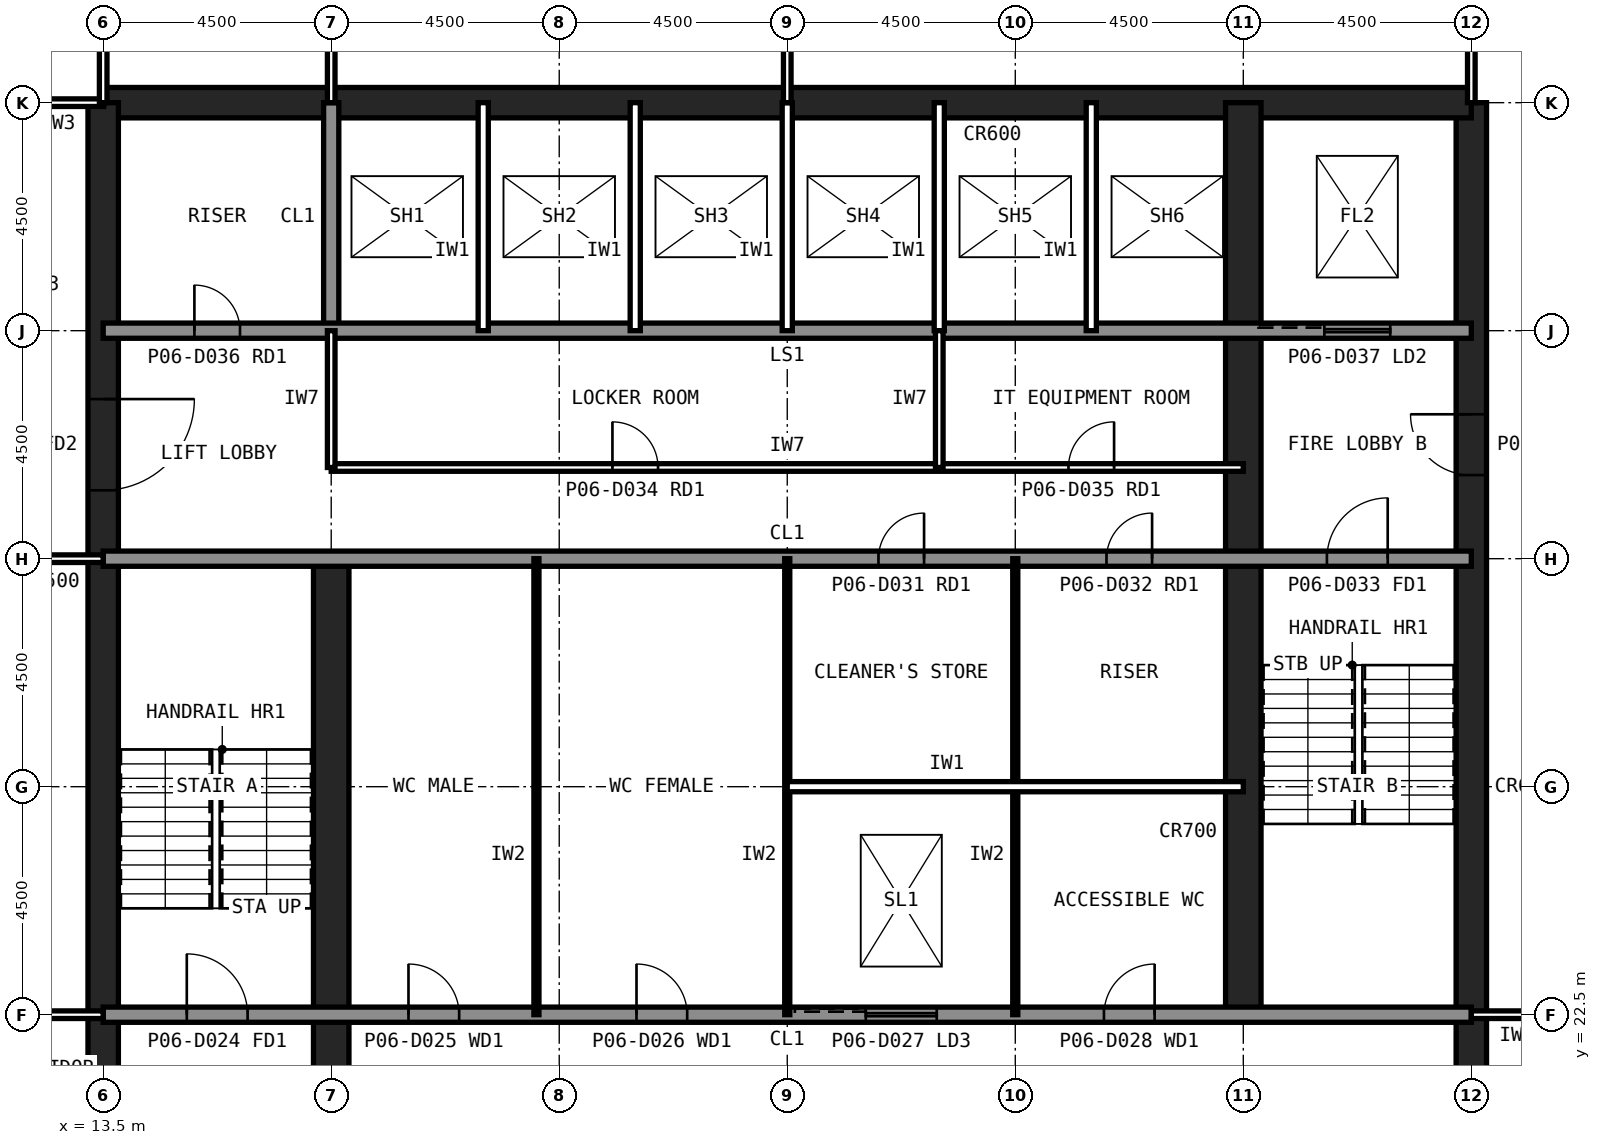
"""IFC4 building model, lengths in metres.
Left out: names, types, materials, properties, quantities, classifications, styles, units other than length and angle.
Written with IfcOpenShell. Run it as: python <this file> out.ifc"""

import sys

from ifc_helpers import new_model, si_unit, direction, frame, frame_2d, origin, place, context, subcontext, project, spatial, rectangle, extrude, element, fill, save


model = new_model("IFC4")
c1 = context("Model", 3, precision=1e-05, world=origin(), true_north=direction((0.0, 1.0)))
c2 = subcontext(c1, "Body", "Model", "MODEL_VIEW")
j1 = project(units=[si_unit("LENGTHUNIT", "METRE"), si_unit("PLANEANGLEUNIT", "RADIAN")], contexts=[c1])
p1 = place(None, origin())
s1 = spatial("IfcSite", under=j1, at=p1, CompositionType="ELEMENT")
p2 = place(p1, origin())
s2 = spatial("IfcBuilding", under=s1, at=p2, CompositionType="ELEMENT")
p3 = place(p2, frame((0.0, 0.0, 29.0)))
s3 = spatial("IfcBuildingStorey", under=s2, at=p3, CompositionType="ELEMENT", Elevation=29.0)
p4 = place(p3, frame((40.5, 13.5, 0.0), z_axis=(0.0, 0.0, 1.0), x_axis=(0.0, 1.0, 0.0)))
e1 = element("IfcWall", 1, at=p4, inside=s3, PredefinedType="SHEAR", context=c2, shape_type="SweptSolid", body=[
    extrude(rectangle(XDim=27.0, YDim=0.6, at=frame_2d((13.5, 0.0))), origin(), (0.0, 0.0, 1.0), 4.2),
])
p5 = place(p4, frame((5.85, 0.0, 0.0)))
e2 = element("IfcOpeningElement", 2, at=p5, cuts=e1, PredefinedType="OPENING", context=c2, shape_type="SweptSolid", body=[
    extrude(rectangle(XDim=1.8, YDim=2.1, at=frame_2d((0.9, 1.05))), frame((0.0, 0.31, 0.0), z_axis=(0.0, -1.0, 0.0), x_axis=(1.0, 0.0, 0.0)), (0.0, 0.0, 1.0), 0.62),
])
p6 = place(p4, frame((19.65, 0.0, 0.0)))
e3 = element("IfcOpeningElement", 3, at=p6, cuts=e1, PredefinedType="OPENING", context=c2, shape_type="SweptSolid", body=[
    extrude(rectangle(XDim=1.2, YDim=2.1, at=frame_2d((0.6, 1.05))), frame((0.0, 0.31, 0.0), z_axis=(0.0, -1.0, 0.0), x_axis=(1.0, 0.0, 0.0)), (0.0, 0.0, 1.0), 0.62),
])
p7 = place(p3, frame((40.5, 40.5, 0.0), z_axis=(0.0, 0.0, 1.0), x_axis=(-1.0, 0.0, 0.0)))
e4 = element("IfcWall", 4, at=p7, inside=s3, PredefinedType="SHEAR", context=c2, shape_type="SweptSolid", body=[
    extrude(rectangle(XDim=27.0, YDim=0.6, at=frame_2d((13.5, 0.0))), origin(), (0.0, 0.0, 1.0), 4.2),
])
p8 = place(p3, frame((13.5, 40.5, 0.0), z_axis=(0.0, 0.0, 1.0), x_axis=(0.0, -1.0, 0.0)))
e5 = element("IfcWall", 5, at=p8, inside=s3, PredefinedType="SHEAR", context=c2, shape_type="SweptSolid", body=[
    extrude(rectangle(XDim=27.0, YDim=0.6, at=frame_2d((13.5, 0.0))), origin(), (0.0, 0.0, 1.0), 4.2),
])
p9 = place(p8, frame((19.65, 0.0, 0.0)))
e6 = element("IfcOpeningElement", 6, at=p9, cuts=e5, PredefinedType="OPENING", context=c2, shape_type="SweptSolid", body=[
    extrude(rectangle(XDim=1.2, YDim=2.1, at=frame_2d((0.6, 1.05))), frame((0.0, 0.31, 0.0), z_axis=(0.0, -1.0, 0.0), x_axis=(1.0, 0.0, 0.0)), (0.0, 0.0, 1.0), 0.62),
])
p10 = place(p8, frame((5.85, 0.0, 0.0)))
e7 = element("IfcOpeningElement", 7, at=p10, cuts=e5, PredefinedType="OPENING", context=c2, shape_type="SweptSolid", body=[
    extrude(rectangle(XDim=1.8, YDim=2.1, at=frame_2d((0.9, 1.05))), frame((0.0, 0.31, 0.0), z_axis=(0.0, -1.0, 0.0), x_axis=(1.0, 0.0, 0.0)), (0.0, 0.0, 1.0), 0.62),
])
p11 = place(p3, frame((18.0, 13.5, 0.0), z_axis=(0.0, 0.0, 1.0), x_axis=(0.0, 1.0, 0.0)))
e8 = element("IfcWall", 8, at=p11, inside=s3, PredefinedType="SHEAR", context=c2, shape_type="SweptSolid", body=[
    extrude(rectangle(XDim=18.0, YDim=0.7, at=frame_2d((9.0, 0.0))), origin(), (0.0, 0.0, 1.0), 4.2),
])
p12 = place(p3, frame((18.0, 36.0, 0.0), z_axis=(0.0, 0.0, 1.0), x_axis=(0.0, 1.0, 0.0)))
e9 = element("IfcWall", 9, at=p12, inside=s3, PredefinedType="SOLIDWALL", context=c2, shape_type="SweptSolid", body=[
    extrude(rectangle(XDim=4.5, YDim=0.3, at=frame_2d((2.25, 0.0))), origin(), (0.0, 0.0, 1.0), 4.04),
])
p13 = place(p3, frame((36.0, 22.5, 0.0), z_axis=(0.0, 0.0, 1.0), x_axis=(0.0, 1.0, 0.0)))
e10 = element("IfcWall", 10, at=p13, inside=s3, PredefinedType="SHEAR", context=c2, shape_type="SweptSolid", body=[
    extrude(rectangle(XDim=18.0, YDim=0.7, at=frame_2d((9.0, 0.0))), origin(), (0.0, 0.0, 1.0), 4.2),
])
p14 = place(p3, frame((13.5, 36.0, 0.0), z_axis=(0.0, 0.0, 1.0), x_axis=(1.0, 0.0, 0.0)))
e11 = element("IfcWall", 11, at=p14, inside=s3, PredefinedType="SOLIDWALL", context=c2, shape_type="SweptSolid", body=[
    extrude(rectangle(XDim=27.0, YDim=0.3, at=frame_2d((13.5, 0.0))), origin(), (0.0, 0.0, 1.0), 4.04),
])
p15 = place(p14, frame((1.8, 0.0, 0.0)))
e12 = element("IfcOpeningElement", 12, at=p15, cuts=e11, PredefinedType="OPENING", context=c2, shape_type="SweptSolid", body=[
    extrude(rectangle(XDim=0.9, YDim=2.1, at=frame_2d((0.45, 1.05))), frame((0.0, 0.16, 0.0), z_axis=(0.0, -1.0, 0.0), x_axis=(1.0, 0.0, 0.0)), (0.0, 0.0, 1.0), 0.32),
])
p16 = place(p14, frame((24.1, 0.0, 0.0)))
e13 = element("IfcOpeningElement", 13, at=p16, cuts=e11, PredefinedType="OPENING", context=c2, shape_type="SweptSolid", body=[
    extrude(rectangle(XDim=1.3, YDim=2.2, at=frame_2d((0.65, 1.1))), frame((0.0, 0.16, 0.0), z_axis=(0.0, -1.0, 0.0), x_axis=(1.0, 0.0, 0.0)), (0.0, 0.0, 1.0), 0.32),
])
p17 = place(p3, frame((13.5, 22.5, 0.0), z_axis=(0.0, 0.0, 1.0), x_axis=(1.0, 0.0, 0.0)))
e14 = element("IfcWall", 14, at=p17, inside=s3, PredefinedType="SOLIDWALL", context=c2, shape_type="SweptSolid", body=[
    extrude(rectangle(XDim=27.0, YDim=0.3, at=frame_2d((13.5, 0.0))), origin(), (0.0, 0.0, 1.0), 4.04),
])
p18 = place(p17, frame((1.65, 0.0, 0.0)))
e15 = element("IfcOpeningElement", 15, at=p18, cuts=e14, PredefinedType="OPENING", context=c2, shape_type="SweptSolid", body=[
    extrude(rectangle(XDim=1.2, YDim=2.1, at=frame_2d((0.6, 1.05))), frame((0.0, 0.16, 0.0), z_axis=(0.0, -1.0, 0.0), x_axis=(1.0, 0.0, 0.0)), (0.0, 0.0, 1.0), 0.32),
])
p19 = place(p17, frame((6.025, 0.0, 0.0)))
e16 = element("IfcOpeningElement", 16, at=p19, cuts=e14, PredefinedType="OPENING", context=c2, shape_type="SweptSolid", body=[
    extrude(rectangle(XDim=1.0, YDim=2.1, at=frame_2d((0.5, 1.05))), frame((0.0, 0.16, 0.0), z_axis=(0.0, -1.0, 0.0), x_axis=(1.0, 0.0, 0.0)), (0.0, 0.0, 1.0), 0.32),
])
p20 = place(p17, frame((10.525, 0.0, 0.0)))
e17 = element("IfcOpeningElement", 17, at=p20, cuts=e14, PredefinedType="OPENING", context=c2, shape_type="SweptSolid", body=[
    extrude(rectangle(XDim=1.0, YDim=2.1, at=frame_2d((0.5, 1.05))), frame((0.0, 0.16, 0.0), z_axis=(0.0, -1.0, 0.0), x_axis=(1.0, 0.0, 0.0)), (0.0, 0.0, 1.0), 0.32),
])
p21 = place(p17, frame((19.75, 0.0, 0.0)))
e18 = element("IfcOpeningElement", 18, at=p21, cuts=e14, PredefinedType="OPENING", context=c2, shape_type="SweptSolid", body=[
    extrude(rectangle(XDim=1.0, YDim=2.1, at=frame_2d((0.5, 1.05))), frame((0.0, 0.16, 0.0), z_axis=(0.0, -1.0, 0.0), x_axis=(1.0, 0.0, 0.0)), (0.0, 0.0, 1.0), 0.32),
])
p22 = place(p17, frame((15.05, 0.0, 0.0)))
e19 = element("IfcOpeningElement", 19, at=p22, cuts=e14, PredefinedType="OPENING", context=c2, shape_type="SweptSolid", body=[
    extrude(rectangle(XDim=1.4, YDim=2.4, at=frame_2d((0.7, 1.2))), frame((0.0, 0.16, 0.0), z_axis=(0.0, -1.0, 0.0), x_axis=(1.0, 0.0, 0.0)), (0.0, 0.0, 1.0), 0.32),
])
p23 = place(p3, frame((13.5, 31.5, 0.0), z_axis=(0.0, 0.0, 1.0), x_axis=(1.0, 0.0, 0.0)))
e20 = element("IfcWall", 20, at=p23, inside=s3, PredefinedType="SOLIDWALL", context=c2, shape_type="SweptSolid", body=[
    extrude(rectangle(XDim=27.0, YDim=0.3, at=frame_2d((13.5, 0.0))), origin(), (0.0, 0.0, 1.0), 4.04),
])
p24 = place(p23, frame((24.15, 0.0, 0.0)))
e21 = element("IfcOpeningElement", 21, at=p24, cuts=e20, PredefinedType="OPENING", context=c2, shape_type="SweptSolid", body=[
    extrude(rectangle(XDim=1.2, YDim=2.1, at=frame_2d((0.6, 1.05))), frame((0.0, 0.16, 0.0), z_axis=(0.0, -1.0, 0.0), x_axis=(1.0, 0.0, 0.0)), (0.0, 0.0, 1.0), 0.32),
])
p25 = place(p23, frame((15.3, 0.0, 0.0)))
e22 = element("IfcOpeningElement", 22, at=p25, cuts=e20, PredefinedType="OPENING", context=c2, shape_type="SweptSolid", body=[
    extrude(rectangle(XDim=0.9, YDim=2.1, at=frame_2d((0.45, 1.05))), frame((0.0, 0.16, 0.0), z_axis=(0.0, -1.0, 0.0), x_axis=(1.0, 0.0, 0.0)), (0.0, 0.0, 1.0), 0.32),
])
p26 = place(p23, frame((19.8, 0.0, 0.0)))
e23 = element("IfcOpeningElement", 23, at=p26, cuts=e20, PredefinedType="OPENING", context=c2, shape_type="SweptSolid", body=[
    extrude(rectangle(XDim=0.9, YDim=2.1, at=frame_2d((0.45, 1.05))), frame((0.0, 0.16, 0.0), z_axis=(0.0, -1.0, 0.0), x_axis=(1.0, 0.0, 0.0)), (0.0, 0.0, 1.0), 0.32),
])
for number, where, z_axis, x_axis in (
    (24, (21.0, 36.0, 0.0), (0.0, 0.0, 1.0), (0.0, 1.0, 0.0)),
    (25, (24.0, 36.0, 0.0), (0.0, 0.0, 1.0), (0.0, 1.0, 0.0)),
    (26, (27.0, 36.0, 0.0), (0.0, 0.0, 1.0), (0.0, 1.0, 0.0)),
    (27, (30.0, 36.0, 0.0), (0.0, 0.0, 1.0), (0.0, 1.0, 0.0)),
    (28, (33.0, 36.0, 0.0), (0.0, 0.0, 1.0), (0.0, 1.0, 0.0)),
):
    element("IfcWall", number, at=place(p3, frame(where, z_axis=z_axis, x_axis=x_axis)), inside=s3, PredefinedType="PARTITIONING", context=c2, shape_type="SweptSolid", body=[
        extrude(rectangle(XDim=4.5, YDim=0.2, at=frame_2d((2.25, 0.0))), origin(), (0.0, 0.0, 1.0), 4.04),
    ])
for number, where, z_axis, x_axis in (
    (29, (22.05, 22.5, 0.0), (0.0, 0.0, 1.0), (0.0, 1.0, 0.0)),
    (30, (27.0, 22.5, 0.0), (0.0, 0.0, 1.0), (0.0, 1.0, 0.0)),
    (31, (31.5, 22.5, 0.0), (0.0, 0.0, 1.0), (0.0, 1.0, 0.0)),
):
    element("IfcWall", number, at=place(p3, frame(where, z_axis=z_axis, x_axis=x_axis)), inside=s3, PredefinedType="PLUMBINGWALL", context=c2, shape_type="SweptSolid", body=[
        extrude(rectangle(XDim=9.0, YDim=0.1, at=frame_2d((4.5, 0.0))), origin(), (0.0, 0.0, 1.0), 4.04),
    ])
p27 = place(p3, frame((27.0, 27.0, 0.0), z_axis=(0.0, 0.0, 1.0), x_axis=(1.0, 0.0, 0.0)))
e32 = element("IfcWall", 32, at=p27, inside=s3, PredefinedType="PARTITIONING", context=c2, shape_type="SweptSolid", body=[
    extrude(rectangle(XDim=9.0, YDim=0.2, at=frame_2d((4.5, 0.0))), origin(), (0.0, 0.0, 1.0), 4.04),
])
p28 = place(p3, frame((18.0, 33.3, 0.0), z_axis=(0.0, 0.0, 1.0), x_axis=(1.0, 0.0, 0.0)))
e33 = element("IfcWall", 33, at=p28, inside=s3, PredefinedType="PARTITIONING", context=c2, shape_type="SweptSolid", body=[
    extrude(rectangle(XDim=18.0, YDim=0.15, at=frame_2d((9.0, 0.0))), origin(), (0.0, 0.0, 1.0), 4.04),
])
p29 = place(p28, frame((5.55, 0.0, 0.0)))
e34 = element("IfcOpeningElement", 34, at=p29, cuts=e33, PredefinedType="OPENING", context=c2, shape_type="SweptSolid", body=[
    extrude(rectangle(XDim=0.9, YDim=2.1, at=frame_2d((0.45, 1.05))), frame((0.0, 0.085, 0.0), z_axis=(0.0, -1.0, 0.0), x_axis=(1.0, 0.0, 0.0)), (0.0, 0.0, 1.0), 0.17),
])
p30 = place(p28, frame((14.55, 0.0, 0.0)))
e35 = element("IfcOpeningElement", 35, at=p30, cuts=e33, PredefinedType="OPENING", context=c2, shape_type="SweptSolid", body=[
    extrude(rectangle(XDim=0.9, YDim=2.1, at=frame_2d((0.45, 1.05))), frame((0.0, 0.085, 0.0), z_axis=(0.0, -1.0, 0.0), x_axis=(1.0, 0.0, 0.0)), (0.0, 0.0, 1.0), 0.17),
])
for number, where, z_axis, x_axis in (
    (36, (18.0, 33.3, 0.0), (0.0, 0.0, 1.0), (0.0, 1.0, 0.0)),
    (37, (30.0, 33.3, 0.0), (0.0, 0.0, 1.0), (0.0, 1.0, 0.0)),
):
    element("IfcWall", number, at=place(p3, frame(where, z_axis=z_axis, x_axis=x_axis)), inside=s3, PredefinedType="PARTITIONING", context=c2, shape_type="SweptSolid", body=[
        extrude(rectangle(XDim=2.7, YDim=0.15, at=frame_2d((1.35, 0.0))), origin(), (0.0, 0.0, 1.0), 4.04),
    ])
p31 = place(p3, frame((13.51, 40.5, 0.0), z_axis=(0.0, 0.0, 1.0), x_axis=(-1.0, 0.0, 0.0)))
e38 = element("IfcWall", 38, at=p31, inside=s3, PredefinedType="PARTITIONING", context=c2, shape_type="SweptSolid", body=[
    extrude(rectangle(XDim=1.81, YDim=0.15, at=frame_2d((0.905, 0.0))), origin(), (0.0, 0.0, 1.0), 3.189),
])
p32 = place(p3, frame((42.3, 22.5, 0.0), z_axis=(0.0, 0.0, 1.0), x_axis=(-1.0, 0.0, 0.0)))
e39 = element("IfcWall", 39, at=p32, inside=s3, PredefinedType="PARTITIONING", context=c2, shape_type="SweptSolid", body=[
    extrude(rectangle(XDim=1.8, YDim=0.15, at=frame_2d((0.9, 0.0))), origin(), (0.0, 0.0, 1.0), 3.189),
])
for number, where, z_axis, x_axis in (
    (40, (27.0, 40.5, 0.0), (0.0, 0.0, 1.0), (0.0, 1.0, 0.0)),
    (41, (18.0, 45.0, 0.0), (0.0, 0.0, 1.0), (0.0, -1.0, 0.0)),
    (42, (9.0, 22.5, 0.0), (0.0, 0.0, 1.0), (1.0, 0.0, 0.0)),
    (43, (13.5, 31.5, 0.0), (0.0, 0.0, 1.0), (-1.0, 0.0, 0.0)),
):
    element("IfcWall", number, at=place(p3, frame(where, z_axis=z_axis, x_axis=x_axis)), inside=s3, PredefinedType="PARTITIONING", context=c2, shape_type="SweptSolid", body=[
        extrude(rectangle(XDim=4.5, YDim=0.15, at=frame_2d((2.25, 0.0))), origin(), (0.0, 0.0, 1.0), 3.189),
    ])
p33 = place(p3, frame((40.5, 49.5, 0.0), z_axis=(0.0, 0.0, 1.0), x_axis=(0.0, -1.0, 0.0)))
e44 = element("IfcWall", 44, at=p33, inside=s3, PredefinedType="PARTITIONING", context=c2, shape_type="SweptSolid", body=[
    extrude(rectangle(XDim=9.0, YDim=0.15, at=frame_2d((4.5, 0.0))), origin(), (0.0, 0.0, 1.0), 3.189),
])
p34 = place(p33, frame((4.0, 0.0, 0.0)))
e45 = element("IfcOpeningElement", 45, at=p34, cuts=e44, PredefinedType="OPENING", context=c2, shape_type="SweptSolid", body=[
    extrude(rectangle(XDim=1.0, YDim=2.1, at=frame_2d((0.5, 1.05))), frame((0.0, 0.085, 0.0), z_axis=(0.0, -1.0, 0.0), x_axis=(1.0, 0.0, 0.0)), (0.0, 0.0, 1.0), 0.17),
])
p35 = place(p3, frame((13.5, 40.5, 0.0), z_axis=(0.0, 0.0, 1.0), x_axis=(0.0, 1.0, 0.0)))
e46 = element("IfcWall", 46, at=p35, inside=s3, PredefinedType="PARTITIONING", context=c2, shape_type="SweptSolid", body=[
    extrude(rectangle(XDim=9.0, YDim=0.15, at=frame_2d((4.5, 0.0))), origin(), (0.0, 0.0, 1.0), 3.189),
])
p36 = place(p35, frame((4.0, 0.0, 0.0)))
e47 = element("IfcOpeningElement", 47, at=p36, cuts=e46, PredefinedType="OPENING", context=c2, shape_type="SweptSolid", body=[
    extrude(rectangle(XDim=1.0, YDim=2.1, at=frame_2d((0.5, 1.05))), frame((0.0, 0.085, 0.0), z_axis=(0.0, -1.0, 0.0), x_axis=(1.0, 0.0, 0.0)), (0.0, 0.0, 1.0), 0.17),
])
p37 = place(p10, origin())
e48 = element("IfcDoor", 48, at=p37, inside=s3, OperationType="SINGLE_SWING_LEFT", PredefinedType="DOOR", context=c2, shape_type="SweptSolid", body=[
    extrude(rectangle(XDim=1.8, YDim=2.1, at=frame_2d((0.9, 1.05))), frame((0.0, 0.025, 0.0), z_axis=(0.0, -1.0, 0.0), x_axis=(1.0, 0.0, 0.0)), (0.0, 0.0, 1.0), 0.05),
])
fill(e7, e48)
p38 = place(p6, origin())
e49 = element("IfcDoor", 49, at=p38, inside=s3, OperationType="SINGLE_SWING_RIGHT", PredefinedType="DOOR", context=c2, shape_type="SweptSolid", body=[
    extrude(rectangle(XDim=1.2, YDim=2.1, at=frame_2d((0.6, 1.05))), frame((0.0, 0.025, 0.0), z_axis=(0.0, -1.0, 0.0), x_axis=(1.0, 0.0, 0.0)), (0.0, 0.0, 1.0), 0.05),
])
fill(e3, e49)
p39 = place(p18, origin())
e50 = element("IfcDoor", 50, at=p39, inside=s3, OperationType="SINGLE_SWING_LEFT", PredefinedType="DOOR", context=c2, shape_type="SweptSolid", body=[
    extrude(rectangle(XDim=1.2, YDim=2.1, at=frame_2d((0.6, 1.05))), frame((0.0, 0.025, 0.0), z_axis=(0.0, -1.0, 0.0), x_axis=(1.0, 0.0, 0.0)), (0.0, 0.0, 1.0), 0.05),
])
fill(e15, e50)
p40 = place(p24, origin())
e51 = element("IfcDoor", 51, at=p40, inside=s3, OperationType="SINGLE_SWING_RIGHT", PredefinedType="DOOR", context=c2, shape_type="SweptSolid", body=[
    extrude(rectangle(XDim=1.2, YDim=2.1, at=frame_2d((0.6, 1.05))), frame((0.0, 0.025, 0.0), z_axis=(0.0, -1.0, 0.0), x_axis=(1.0, 0.0, 0.0)), (0.0, 0.0, 1.0), 0.05),
])
fill(e21, e51)
p41 = place(p19, origin())
e52 = element("IfcDoor", 52, at=p41, inside=s3, OperationType="SINGLE_SWING_LEFT", PredefinedType="DOOR", context=c2, shape_type="SweptSolid", body=[
    extrude(rectangle(XDim=1.0, YDim=2.1, at=frame_2d((0.5, 1.05))), frame((0.0, 0.025, 0.0), z_axis=(0.0, -1.0, 0.0), x_axis=(1.0, 0.0, 0.0)), (0.0, 0.0, 1.0), 0.05),
])
fill(e16, e52)
p42 = place(p20, origin())
e53 = element("IfcDoor", 53, at=p42, inside=s3, OperationType="SINGLE_SWING_LEFT", PredefinedType="DOOR", context=c2, shape_type="SweptSolid", body=[
    extrude(rectangle(XDim=1.0, YDim=2.1, at=frame_2d((0.5, 1.05))), frame((0.0, 0.025, 0.0), z_axis=(0.0, -1.0, 0.0), x_axis=(1.0, 0.0, 0.0)), (0.0, 0.0, 1.0), 0.05),
])
fill(e17, e53)
p43 = place(p21, origin())
e54 = element("IfcDoor", 54, at=p43, inside=s3, OperationType="SINGLE_SWING_RIGHT", PredefinedType="DOOR", context=c2, shape_type="SweptSolid", body=[
    extrude(rectangle(XDim=1.0, YDim=2.1, at=frame_2d((0.5, 1.05))), frame((0.0, 0.025, 0.0), z_axis=(0.0, -1.0, 0.0), x_axis=(1.0, 0.0, 0.0)), (0.0, 0.0, 1.0), 0.05),
])
fill(e18, e54)
p44 = place(p25, origin())
e55 = element("IfcDoor", 55, at=p44, inside=s3, OperationType="SINGLE_SWING_RIGHT", PredefinedType="DOOR", context=c2, shape_type="SweptSolid", body=[
    extrude(rectangle(XDim=0.9, YDim=2.1, at=frame_2d((0.45, 1.05))), frame((0.0, 0.025, 0.0), z_axis=(0.0, -1.0, 0.0), x_axis=(1.0, 0.0, 0.0)), (0.0, 0.0, 1.0), 0.05),
])
fill(e22, e55)
p45 = place(p26, origin())
e56 = element("IfcDoor", 56, at=p45, inside=s3, OperationType="SINGLE_SWING_RIGHT", PredefinedType="DOOR", context=c2, shape_type="SweptSolid", body=[
    extrude(rectangle(XDim=0.9, YDim=2.1, at=frame_2d((0.45, 1.05))), frame((0.0, 0.025, 0.0), z_axis=(0.0, -1.0, 0.0), x_axis=(1.0, 0.0, 0.0)), (0.0, 0.0, 1.0), 0.05),
])
fill(e23, e56)
p46 = place(p15, origin())
e57 = element("IfcDoor", 57, at=p46, inside=s3, OperationType="SINGLE_SWING_LEFT", PredefinedType="DOOR", context=c2, shape_type="SweptSolid", body=[
    extrude(rectangle(XDim=0.9, YDim=2.1, at=frame_2d((0.45, 1.05))), frame((0.0, 0.025, 0.0), z_axis=(0.0, -1.0, 0.0), x_axis=(1.0, 0.0, 0.0)), (0.0, 0.0, 1.0), 0.05),
])
fill(e12, e57)
p47 = place(p29, origin())
e58 = element("IfcDoor", 58, at=p47, inside=s3, OperationType="SINGLE_SWING_LEFT", PredefinedType="DOOR", context=c2, shape_type="SweptSolid", body=[
    extrude(rectangle(XDim=0.9, YDim=2.1, at=frame_2d((0.45, 1.05))), frame((0.0, 0.025, 0.0), z_axis=(0.0, -1.0, 0.0), x_axis=(1.0, 0.0, 0.0)), (0.0, 0.0, 1.0), 0.05),
])
fill(e34, e58)
p48 = place(p30, origin())
e59 = element("IfcDoor", 59, at=p48, inside=s3, OperationType="SINGLE_SWING_RIGHT", PredefinedType="DOOR", context=c2, shape_type="SweptSolid", body=[
    extrude(rectangle(XDim=0.9, YDim=2.1, at=frame_2d((0.45, 1.05))), frame((0.0, 0.025, 0.0), z_axis=(0.0, -1.0, 0.0), x_axis=(1.0, 0.0, 0.0)), (0.0, 0.0, 1.0), 0.05),
])
fill(e35, e59)
p49 = place(p16, origin())
e60 = element("IfcDoor", 60, at=p49, inside=s3, OperationType="SLIDING_TO_LEFT", PredefinedType="DOOR", context=c2, shape_type="SweptSolid", body=[
    extrude(rectangle(XDim=1.3, YDim=2.2, at=frame_2d((0.65, 1.1))), frame((0.0, 0.025, 0.0), z_axis=(0.0, -1.0, 0.0), x_axis=(1.0, 0.0, 0.0)), (0.0, 0.0, 1.0), 0.05),
])
fill(e13, e60)
p50 = place(p22, origin())
e61 = element("IfcDoor", 61, at=p50, inside=s3, OperationType="SLIDING_TO_LEFT", PredefinedType="DOOR", context=c2, shape_type="SweptSolid", body=[
    extrude(rectangle(XDim=1.4, YDim=2.4, at=frame_2d((0.7, 1.2))), frame((0.0, 0.025, 0.0), z_axis=(0.0, -1.0, 0.0), x_axis=(1.0, 0.0, 0.0)), (0.0, 0.0, 1.0), 0.05),
])
fill(e19, e61)
save(model, sys.argv[1])
